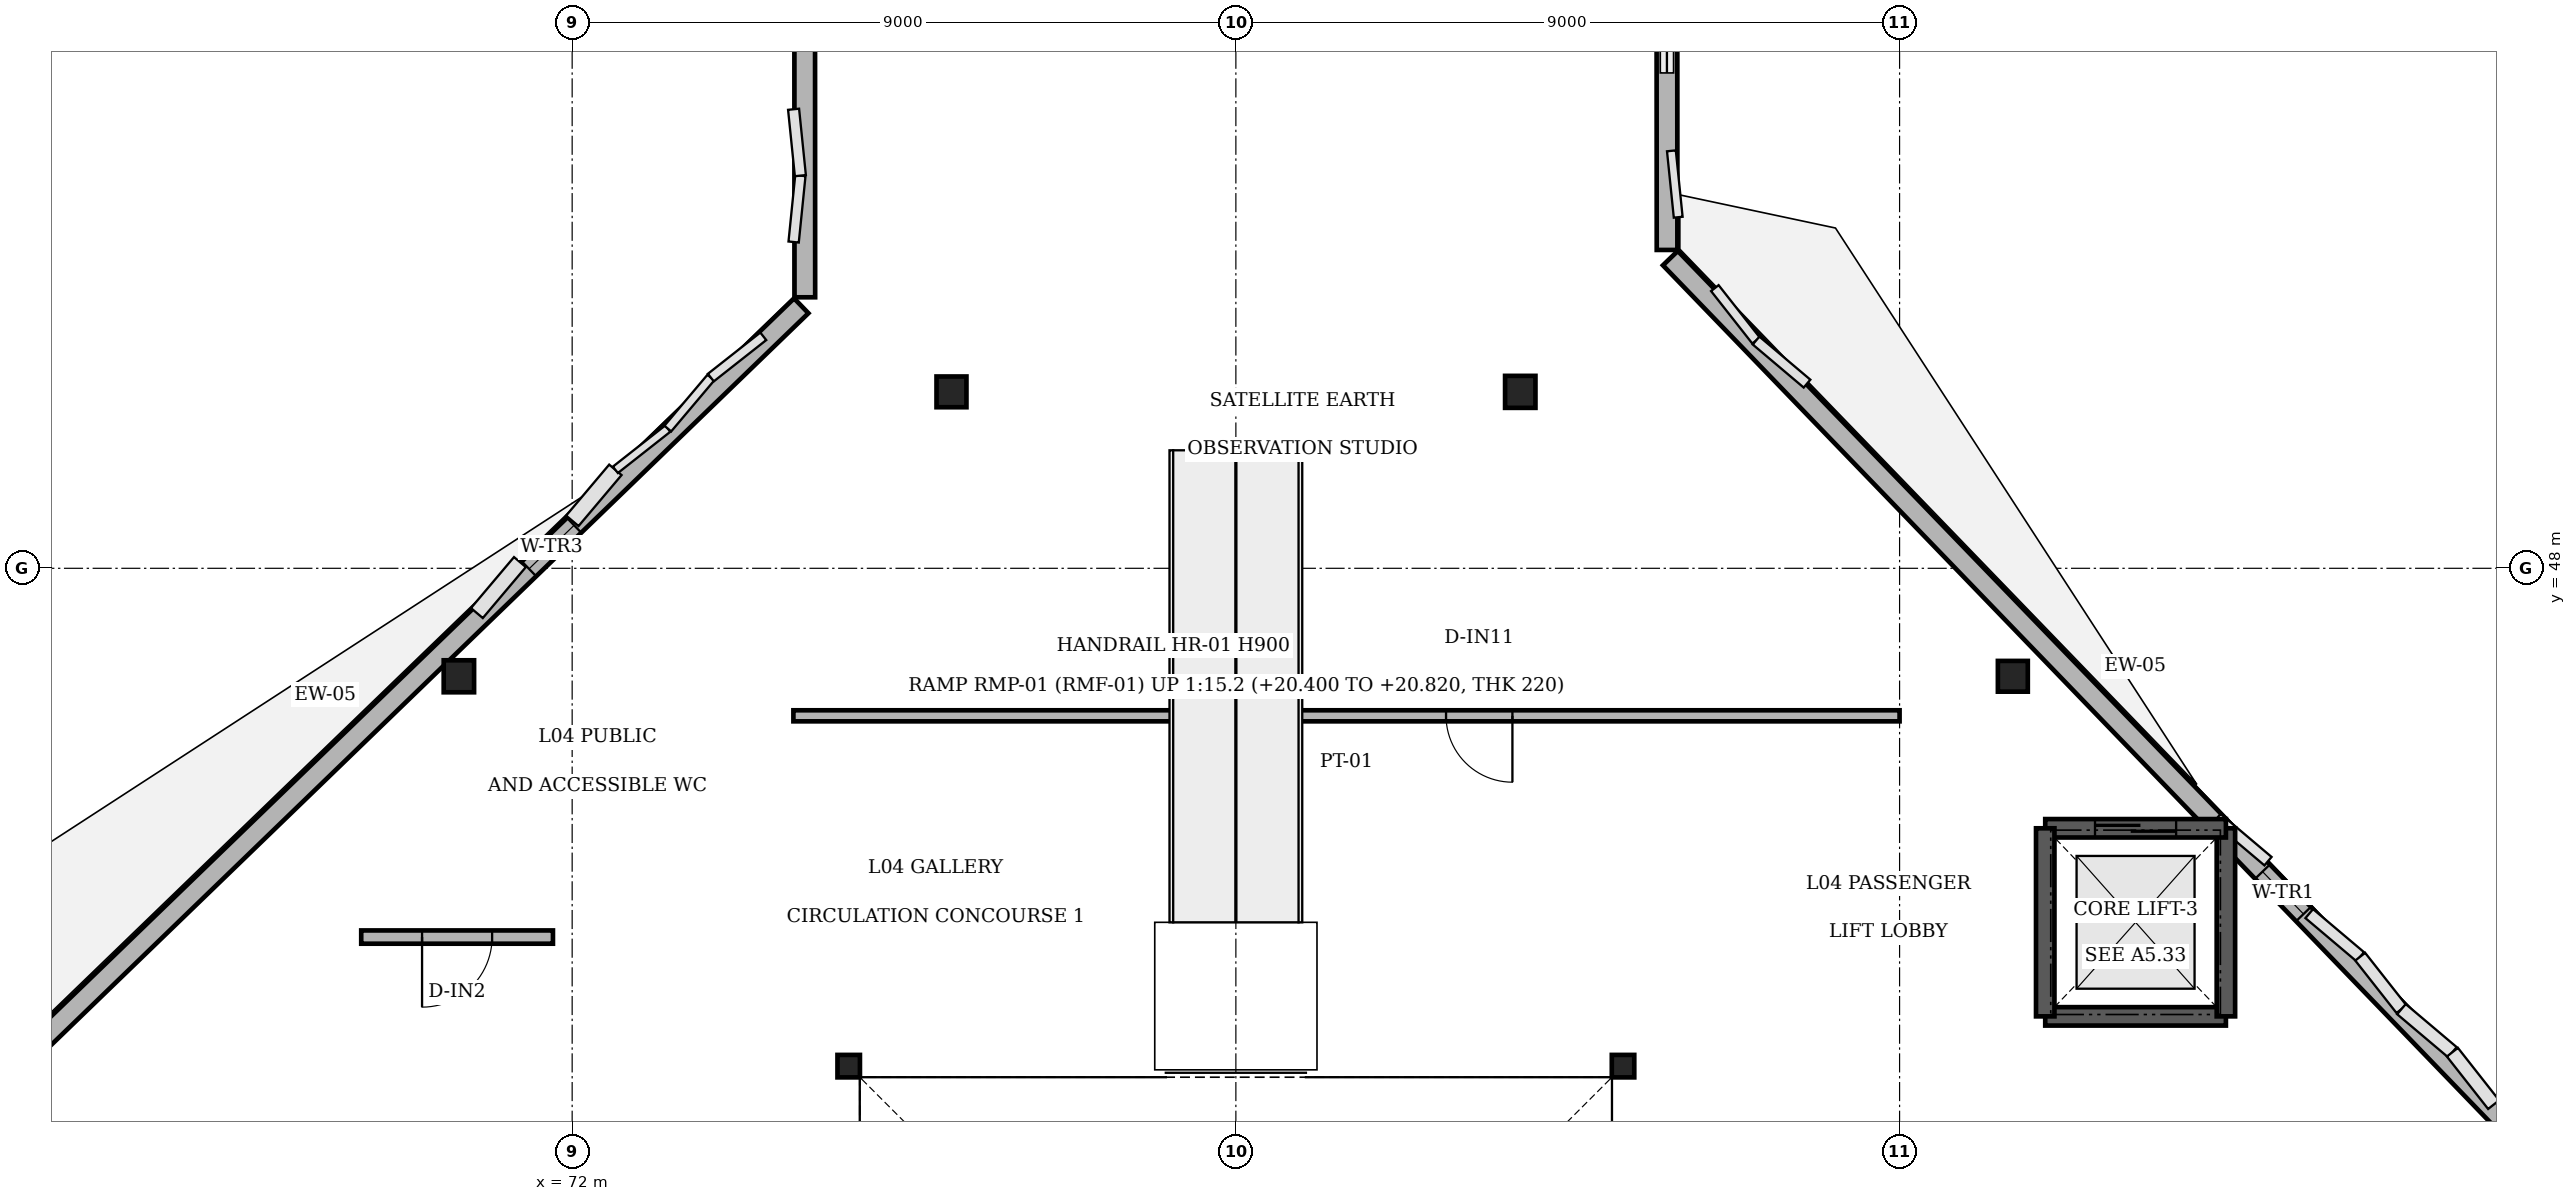
"""IFC4 building model, lengths in metres.
Left out: names, types, materials, properties, quantities, classifications, styles, units other than length and angle.
Written with IfcOpenShell. Run it as: python <this file> out.ifc"""

import sys

from ifc_helpers import new_model, si_unit, direction, frame, frame_2d, origin, origin_2d, place, context, subcontext, project, spatial, rectangle, hollow_rectangle, i_section, extrude, element, fill, save


model = new_model("IFC4")
c1 = context("Model", 3, precision=1e-05, world=origin(), true_north=direction((0.0, 1.0)))
c2 = subcontext(c1, "Body", "Model", "MODEL_VIEW")
j1 = project(units=[si_unit("LENGTHUNIT", "METRE"), si_unit("PLANEANGLEUNIT", "RADIAN")], contexts=[c1])
p1 = place(None, origin())
s1 = spatial("IfcSite", under=j1, at=p1, CompositionType="ELEMENT")
p2 = place(p1, origin())
s2 = spatial("IfcBuilding", under=s1, at=p2, CompositionType="ELEMENT")
p3 = place(p2, frame((0.0, 0.0, 20.4)))
s3 = spatial("IfcBuildingStorey", under=s2, at=p3, CompositionType="ELEMENT", Elevation=20.4)
p4 = place(p3, frame((91.536, 46.536, 0.0), z_axis=(0.0, 0.0, 1.0), x_axis=(1.0, 0.0, 0.0)))
e1 = element("IfcColumn", 1, at=p4, inside=s3, PredefinedType="COLUMN", context=c2, shape_type="SweptSolid", body=[
    extrude(i_section(OverallWidth=0.406, OverallDepth=0.417, WebThickness=0.03, FlangeThickness=0.044, FilletRadius=0.015, at=origin_2d()), origin(), (0.0, 0.0, 1.0), 4.8),
])
p5 = place(p3, frame((84.856, 50.392, 0.0), z_axis=(0.0, 0.0, 1.0), x_axis=(1.0, 0.0, 0.0)))
e2 = element("IfcColumn", 2, at=p5, inside=s3, PredefinedType="COLUMN", context=c2, shape_type="SweptSolid", body=[
    extrude(i_section(OverallWidth=0.412, OverallDepth=0.434, WebThickness=0.036, FlangeThickness=0.044, FilletRadius=0.015, at=origin_2d()), origin(), (0.0, 0.0, 1.0), 4.8),
])
p6 = place(p3, frame((77.144, 50.392, 0.0), z_axis=(0.0, 0.0, 1.0), x_axis=(1.0, 0.0, 0.0)))
e3 = element("IfcColumn", 3, at=p6, inside=s3, PredefinedType="COLUMN", context=c2, shape_type="SweptSolid", body=[
    extrude(i_section(OverallWidth=0.406, OverallDepth=0.417, WebThickness=0.03, FlangeThickness=0.044, FilletRadius=0.015, at=origin_2d()), origin(), (0.0, 0.0, 1.0), 4.8),
])
p7 = place(p3, frame((70.464, 46.536, 0.0), z_axis=(0.0, 0.0, 1.0), x_axis=(1.0, 0.0, 0.0)))
e4 = element("IfcColumn", 4, at=p7, inside=s3, PredefinedType="COLUMN", context=c2, shape_type="SweptSolid", body=[
    extrude(i_section(OverallWidth=0.412, OverallDepth=0.434, WebThickness=0.036, FlangeThickness=0.044, FilletRadius=0.015, at=origin_2d()), origin(), (0.0, 0.0, 1.0), 4.8),
])
for number, where, z_axis, x_axis in (
    (5, (86.25, 41.25, 0.0), (0.0, 0.0, 1.0), (1.0, 0.0, 0.0)),
    (6, (75.75, 41.25, 0.0), (0.0, 0.0, 1.0), (1.0, 0.0, 0.0)),
):
    element("IfcColumn", number, at=place(p3, frame(where, z_axis=z_axis, x_axis=x_axis)), inside=s3, PredefinedType="COLUMN", context=c2, shape_type="SweptSolid", body=[
        extrude(hollow_rectangle(XDim=0.305, YDim=0.305, WallThickness=0.015, InnerFilletRadius=0.015, OuterFilletRadius=0.029, at=origin_2d()), origin(), (0.0, 0.0, 1.0), 4.8),
    ])
p8 = place(p3, frame((86.84, 64.004, 0.0), z_axis=(0.0, 0.0, 1.0), x_axis=(0.000584892948, -0.99999982895, 0.0)))
e7 = element("IfcWall", 7, at=p8, inside=s3, PredefinedType="SOLIDWALL", context=c2, shape_type="SweptSolid", body=[
    extrude(rectangle(XDim=11.688, YDim=0.28, at=frame_2d((5.844, 0.0))), origin(), (0.0, 0.0, 1.0), 2.45),
])
p9 = place(p3, frame((86.892, 52.206, 0.0), z_axis=(0.0, 0.0, 1.0), x_axis=(0.69454396719, -0.719450260713, 0.0)))
e8 = element("IfcWall", 8, at=p9, inside=s3, PredefinedType="SOLIDWALL", context=c2, shape_type="SweptSolid", body=[
    extrude(rectangle(XDim=16.723, YDim=0.28, at=frame_2d((8.361, 0.0))), origin(), (0.0, 0.0, 1.0), 3.629),
])
p10 = place(p9, frame((11.561, 0.0, 1.05)))
e9 = element("IfcOpeningElement", 9, at=p10, cuts=e8, PredefinedType="OPENING", context=c2, shape_type="SweptSolid", body=[
    extrude(rectangle(XDim=0.8, YDim=1.5, at=frame_2d((0.4, 0.75))), frame((0.0, 0.15, 0.0), z_axis=(0.0, -1.0, 0.0), x_axis=(1.0, 0.0, 0.0)), (0.0, 0.0, 1.0), 0.3),
])
p11 = place(p3, frame((63.157, 40.013, 0.0), z_axis=(0.0, 0.0, 1.0), x_axis=(0.719146215945, 0.694858777085, 0.0)))
e10 = element("IfcWall", 10, at=p11, inside=s3, PredefinedType="SOLIDWALL", context=c2, shape_type="SweptSolid", body=[
    extrude(rectangle(XDim=16.616, YDim=0.28, at=frame_2d((8.308, 0.0))), origin(), (0.0, 0.0, 1.0), 3.484),
])
p12 = place(p11, frame((11.483, 0.0, 1.05)))
e11 = element("IfcOpeningElement", 11, at=p12, cuts=e10, PredefinedType="OPENING", context=c2, shape_type="SweptSolid", body=[
    extrude(rectangle(XDim=0.85, YDim=1.6, at=frame_2d((0.425, 0.8))), frame((0.0, 0.15, 0.0), z_axis=(0.0, -1.0, 0.0), x_axis=(1.0, 0.0, 0.0)), (0.0, 0.0, 1.0), 0.3),
])
p13 = place(p3, frame((75.155, 51.675, 0.0), z_axis=(0.0, 0.0, 1.0), x_axis=(-0.000436715855, 0.99999990464, 0.0)))
e12 = element("IfcWall", 12, at=p13, inside=s3, PredefinedType="SOLIDWALL", context=c2, shape_type="SweptSolid", body=[
    extrude(rectangle(XDim=12.299, YDim=0.28, at=frame_2d((6.149, 0.0))), origin(), (0.0, 0.0, 1.0), 3.626),
])
p14 = place(p3, frame((91.975, 41.925, 0.0), z_axis=(0.0, 0.0, 1.0), x_axis=(1.0, 0.0, 0.0)))
e13 = element("IfcWall", 13, at=p14, inside=s3, PredefinedType="SOLIDWALL", context=c2, shape_type="SweptSolid", body=[
    extrude(rectangle(XDim=2.45, YDim=0.25, at=frame_2d((1.225, 0.0))), origin(), (0.0, 0.0, 1.0), 4.8),
])
p15 = place(p3, frame((94.425, 41.925, 0.0), z_axis=(0.0, 0.0, 1.0), x_axis=(0.0, 1.0, 0.0)))
e14 = element("IfcWall", 14, at=p15, inside=s3, PredefinedType="SOLIDWALL", context=c2, shape_type="SweptSolid", body=[
    extrude(rectangle(XDim=2.55, YDim=0.25, at=frame_2d((1.275, 0.0))), origin(), (0.0, 0.0, 1.0), 4.8),
])
p16 = place(p3, frame((94.425, 44.475, 0.0), z_axis=(0.0, 0.0, 1.0), x_axis=(-1.0, 0.0, 0.0)))
e15 = element("IfcWall", 15, at=p16, inside=s3, PredefinedType="SOLIDWALL", context=c2, shape_type="SweptSolid", body=[
    extrude(rectangle(XDim=2.45, YDim=0.25, at=frame_2d((1.225, 0.0))), origin(), (0.0, 0.0, 1.0), 4.8),
])
p17 = place(p16, frame((0.675, 0.0, 0.0)))
e16 = element("IfcOpeningElement", 16, at=p17, cuts=e15, PredefinedType="OPENING", context=c2, shape_type="SweptSolid", body=[
    extrude(rectangle(XDim=1.1, YDim=2.2, at=frame_2d((0.55, 1.1))), frame((0.0, 0.135, 0.0), z_axis=(0.0, -1.0, 0.0), x_axis=(1.0, 0.0, 0.0)), (0.0, 0.0, 1.0), 0.27),
])
p18 = place(p3, frame((91.975, 44.475, 0.0), z_axis=(0.0, 0.0, 1.0), x_axis=(0.0, -1.0, 0.0)))
e17 = element("IfcWall", 17, at=p18, inside=s3, PredefinedType="SOLIDWALL", context=c2, shape_type="SweptSolid", body=[
    extrude(rectangle(XDim=2.55, YDim=0.25, at=frame_2d((1.275, 0.0))), origin(), (0.0, 0.0, 1.0), 4.8),
])
p19 = place(p3, frame((90.0, 46.0, 0.0), z_axis=(0.0, 0.0, 1.0), x_axis=(-1.0, 0.0, 0.0)))
e18 = element("IfcWall", 18, at=p19, inside=s3, PredefinedType="PARTITIONING", context=c2, shape_type="SweptSolid", body=[
    extrude(rectangle(XDim=15.0, YDim=0.15, at=frame_2d((7.5, 0.0))), origin(), (0.0, 0.0, 1.0), 3.15),
])
p20 = place(p19, frame((5.25, 0.0, 0.0)))
e19 = element("IfcOpeningElement", 19, at=p20, cuts=e18, PredefinedType="OPENING", context=c2, shape_type="SweptSolid", body=[
    extrude(rectangle(XDim=0.9, YDim=2.1, at=frame_2d((0.45, 1.05))), frame((0.0, 0.085, 0.0), z_axis=(0.0, -1.0, 0.0), x_axis=(1.0, 0.0, 0.0)), (0.0, 0.0, 1.0), 0.17),
])
p21 = place(p3, frame((71.74, 43.0, 0.0), z_axis=(0.0, 0.0, 1.0), x_axis=(-1.0, 0.0, 0.0)))
e20 = element("IfcWall", 20, at=p21, inside=s3, PredefinedType="PARTITIONING", context=c2, shape_type="SweptSolid", body=[
    extrude(rectangle(XDim=2.6, YDim=0.18, at=frame_2d((1.3, 0.0))), origin(), (0.0, 0.0, 1.0), 3.15),
])
p22 = place(p21, frame((0.825, 0.0, 0.0)))
e21 = element("IfcOpeningElement", 21, at=p22, cuts=e20, PredefinedType="OPENING", context=c2, shape_type="SweptSolid", body=[
    extrude(rectangle(XDim=0.95, YDim=2.15, at=frame_2d((0.475, 1.075))), frame((0.0, 0.1, 0.0), z_axis=(0.0, -1.0, 0.0), x_axis=(1.0, 0.0, 0.0)), (0.0, 0.0, 1.0), 0.2),
])
p23 = place(p10, origin())
e22 = element("IfcWindow", 22, at=p23, inside=s3, PartitioningType="SINGLE_PANEL", PredefinedType="WINDOW", context=c2, shape_type="SweptSolid", body=[
    extrude(rectangle(XDim=0.8, YDim=1.5, at=frame_2d((0.4, 0.75))), frame((0.0, 0.03, 0.0), z_axis=(0.0, -1.0, 0.0), x_axis=(1.0, 0.0, 0.0)), (0.0, 0.0, 1.0), 0.06),
])
fill(e9, e22)
p24 = place(p12, origin())
e23 = element("IfcWindow", 23, at=p24, inside=s3, PartitioningType="SINGLE_PANEL", PredefinedType="WINDOW", context=c2, shape_type="SweptSolid", body=[
    extrude(rectangle(XDim=0.85, YDim=1.6, at=frame_2d((0.425, 0.8))), frame((0.0, 0.03, 0.0), z_axis=(0.0, -1.0, 0.0), x_axis=(1.0, 0.0, 0.0)), (0.0, 0.0, 1.0), 0.06),
])
fill(e11, e23)
p25 = place(p17, origin())
e24 = element("IfcDoor", 24, at=p25, inside=s3, OperationType="SLIDING_TO_LEFT", PredefinedType="DOOR", context=c2, shape_type="SweptSolid", body=[
    extrude(rectangle(XDim=1.1, YDim=2.2, at=frame_2d((0.55, 1.1))), frame((0.0, 0.025, 0.0), z_axis=(0.0, -1.0, 0.0), x_axis=(1.0, 0.0, 0.0)), (0.0, 0.0, 1.0), 0.05),
])
fill(e16, e24)
p26 = place(p22, origin())
e25 = element("IfcDoor", 25, at=p26, inside=s3, OperationType="SINGLE_SWING_RIGHT", PredefinedType="DOOR", context=c2, shape_type="SweptSolid", body=[
    extrude(rectangle(XDim=0.95, YDim=2.15, at=frame_2d((0.475, 1.075))), frame((0.0, 0.025, 0.0), z_axis=(0.0, -1.0, 0.0), x_axis=(1.0, 0.0, 0.0)), (0.0, 0.0, 1.0), 0.05),
])
fill(e21, e25)
p27 = place(p20, origin())
e26 = element("IfcDoor", 26, at=p27, inside=s3, OperationType="SINGLE_SWING_LEFT", PredefinedType="DOOR", context=c2, shape_type="SweptSolid", body=[
    extrude(rectangle(XDim=0.9, YDim=2.1, at=frame_2d((0.45, 1.05))), frame((0.0, 0.025, 0.0), z_axis=(0.0, -1.0, 0.0), x_axis=(1.0, 0.0, 0.0)), (0.0, 0.0, 1.0), 0.05),
])
fill(e19, e26)
save(model, sys.argv[1])
